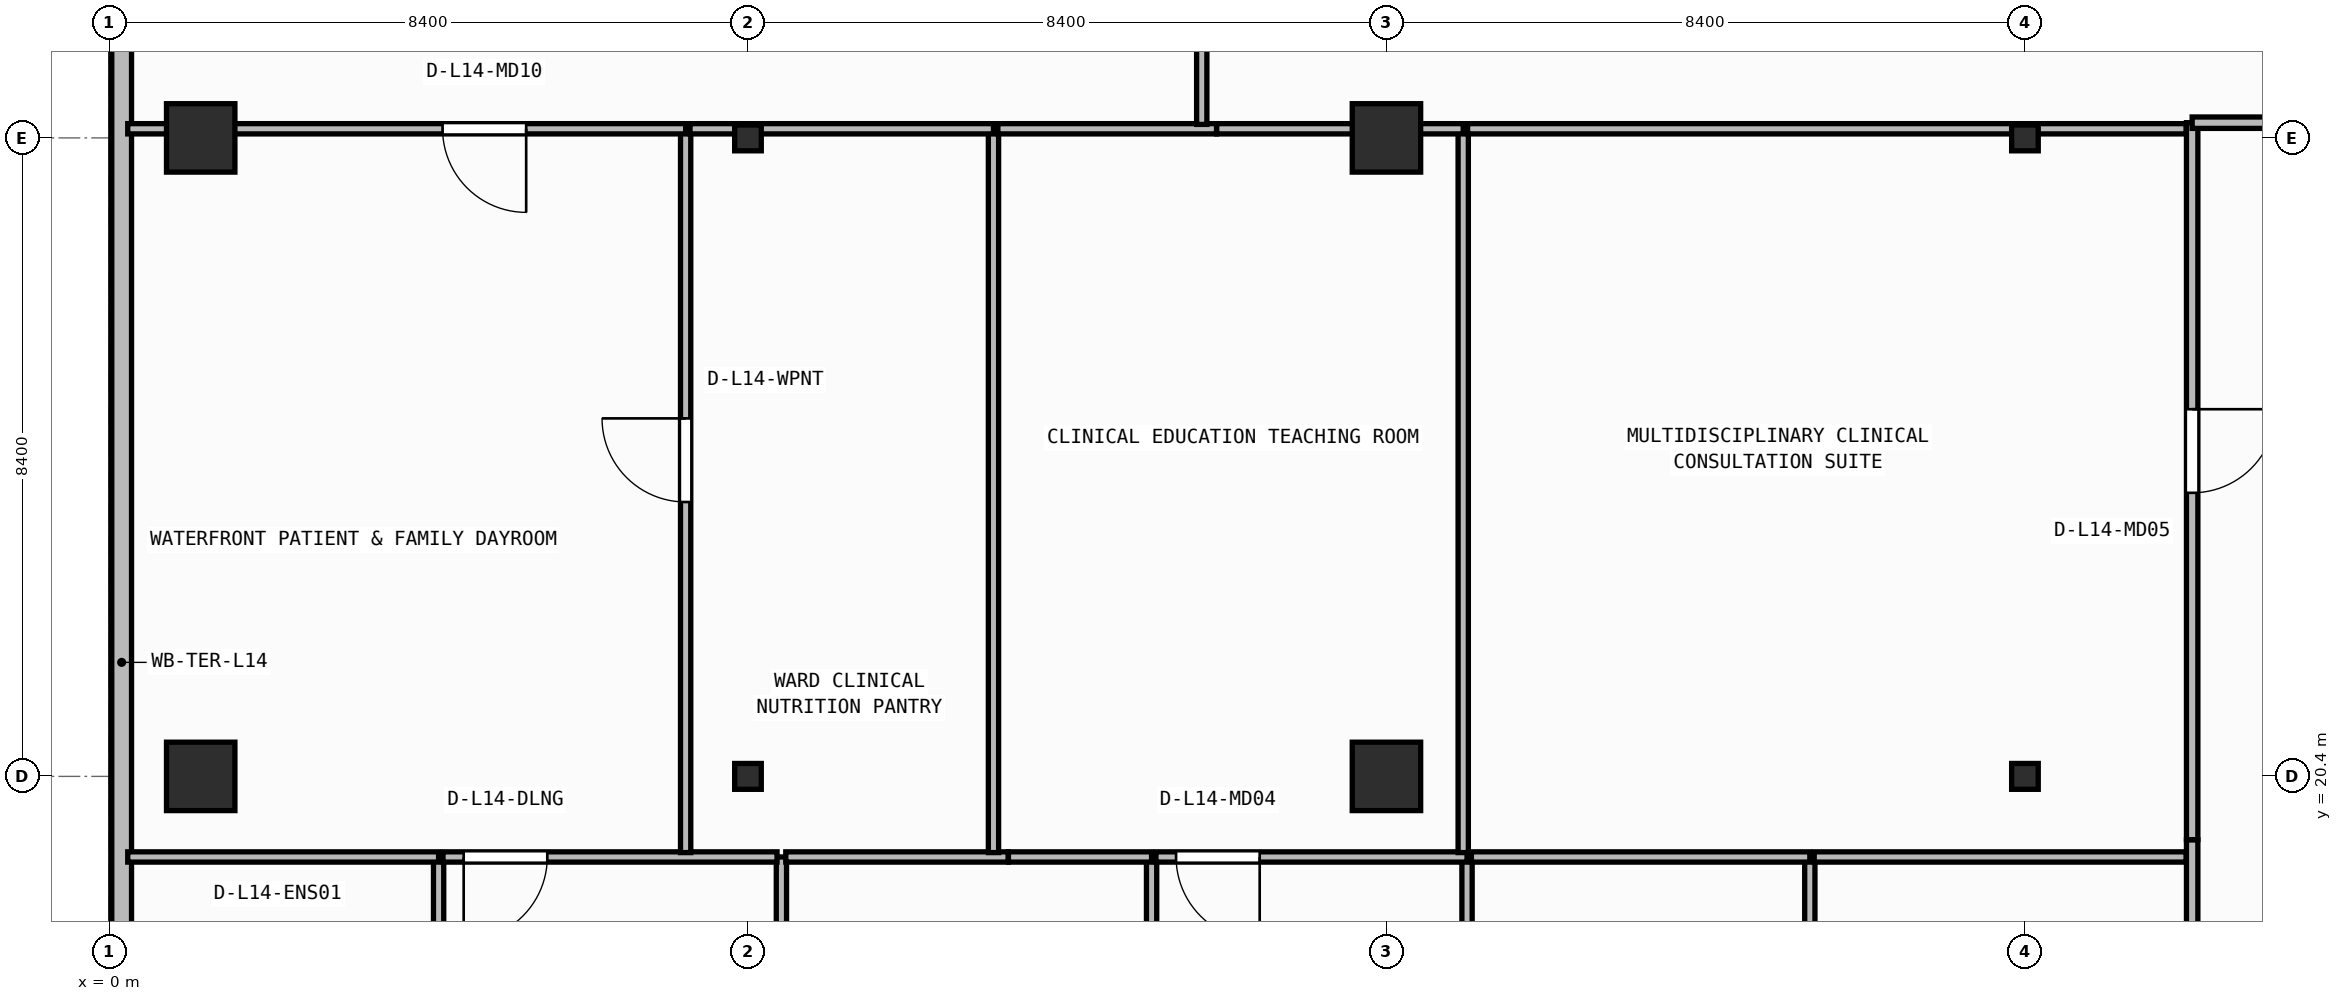
"""IFC4 building model, lengths in metres.
Left out: names, types, materials, properties, quantities, classifications, styles, units other than length and angle.
Written with IfcOpenShell. Run it as: python <this file> out.ifc"""

import sys

from ifc_helpers import new_model, si_unit, direction, frame, frame_2d, origin, origin_2d, place, context, subcontext, project, spatial, rectangle, i_section, extrude, element, fill, save


model = new_model("IFC4")
c1 = context("Model", 3, precision=1e-05, world=origin(), true_north=direction((0.0, 1.0)))
c2 = subcontext(c1, "Body", "Model", "MODEL_VIEW")
j1 = project(units=[si_unit("LENGTHUNIT", "METRE"), si_unit("PLANEANGLEUNIT", "RADIAN")], contexts=[c1])
p1 = place(None, origin())
s1 = spatial("IfcSite", under=j1, at=p1, CompositionType="ELEMENT")
p2 = place(p1, origin())
s2 = spatial("IfcBuilding", under=s1, at=p2, CompositionType="ELEMENT")
p3 = place(p2, frame((0.0, 0.0, 58.05)))
s3 = spatial("IfcBuildingStorey", under=s2, at=p3, CompositionType="ELEMENT", Elevation=58.05)
p4 = place(p3, frame((1.2, 20.4, 0.0), z_axis=(0.0, 0.0, 1.0), x_axis=(1.0, 0.0, 0.0)))
e1 = element("IfcColumn", 1, at=p4, inside=s3, PredefinedType="COLUMN", context=c2, shape_type="SweptSolid", body=[
    extrude(rectangle(XDim=0.9, YDim=0.9, at=origin_2d()), origin(), (0.0, 0.0, 1.0), 3.95),
])
p5 = place(p3, frame((8.4, 20.4, 0.0), z_axis=(0.0, 0.0, 1.0), x_axis=(1.0, 0.0, 0.0)))
e2 = element("IfcColumn", 2, at=p5, inside=s3, PredefinedType="COLUMN", context=c2, shape_type="SweptSolid", body=[
    extrude(i_section(OverallWidth=0.35, OverallDepth=0.34, WebThickness=0.016, FlangeThickness=0.028, at=origin_2d()), origin(), (0.0, 0.0, 1.0), 3.95),
])
p6 = place(p3, frame((16.8, 20.4, 0.0), z_axis=(0.0, 0.0, 1.0), x_axis=(1.0, 0.0, 0.0)))
e3 = element("IfcColumn", 3, at=p6, inside=s3, PredefinedType="COLUMN", context=c2, shape_type="SweptSolid", body=[
    extrude(rectangle(XDim=0.9, YDim=0.9, at=origin_2d()), origin(), (0.0, 0.0, 1.0), 3.95),
])
p7 = place(p3, frame((25.2, 20.4, 0.0), z_axis=(0.0, 0.0, 1.0), x_axis=(1.0, 0.0, 0.0)))
e4 = element("IfcColumn", 4, at=p7, inside=s3, PredefinedType="COLUMN", context=c2, shape_type="SweptSolid", body=[
    extrude(i_section(OverallWidth=0.35, OverallDepth=0.34, WebThickness=0.016, FlangeThickness=0.028, at=origin_2d()), origin(), (0.0, 0.0, 1.0), 3.95),
])
p8 = place(p3, frame((1.2, 28.8, 0.0), z_axis=(0.0, 0.0, 1.0), x_axis=(1.0, 0.0, 0.0)))
e5 = element("IfcColumn", 5, at=p8, inside=s3, PredefinedType="COLUMN", context=c2, shape_type="SweptSolid", body=[
    extrude(rectangle(XDim=0.9, YDim=0.9, at=origin_2d()), origin(), (0.0, 0.0, 1.0), 3.95),
])
p9 = place(p3, frame((8.4, 28.8, 0.0), z_axis=(0.0, 0.0, 1.0), x_axis=(1.0, 0.0, 0.0)))
e6 = element("IfcColumn", 6, at=p9, inside=s3, PredefinedType="COLUMN", context=c2, shape_type="SweptSolid", body=[
    extrude(i_section(OverallWidth=0.35, OverallDepth=0.34, WebThickness=0.016, FlangeThickness=0.028, at=origin_2d()), origin(), (0.0, 0.0, 1.0), 3.95),
])
p10 = place(p3, frame((16.8, 28.8, 0.0), z_axis=(0.0, 0.0, 1.0), x_axis=(1.0, 0.0, 0.0)))
e7 = element("IfcColumn", 7, at=p10, inside=s3, PredefinedType="COLUMN", context=c2, shape_type="SweptSolid", body=[
    extrude(rectangle(XDim=0.9, YDim=0.9, at=origin_2d()), origin(), (0.0, 0.0, 1.0), 3.95),
])
p11 = place(p3, frame((25.2, 28.8, 0.0), z_axis=(0.0, 0.0, 1.0), x_axis=(1.0, 0.0, 0.0)))
e8 = element("IfcColumn", 8, at=p11, inside=s3, PredefinedType="COLUMN", context=c2, shape_type="SweptSolid", body=[
    extrude(i_section(OverallWidth=0.35, OverallDepth=0.34, WebThickness=0.016, FlangeThickness=0.028, at=origin_2d()), origin(), (0.0, 0.0, 1.0), 3.95),
])
p12 = place(p3, frame((0.16, 41.04, 0.0), z_axis=(0.0, 0.0, 1.0), x_axis=(0.0, -1.0, 0.0)))
e9 = element("IfcWall", 9, at=p12, inside=s3, PredefinedType="STANDARD", context=c2, shape_type="SweptSolid", body=[
    extrude(rectangle(XDim=38.28, YDim=0.26, at=frame_2d((19.14, 0.0))), origin(), (0.0, 0.0, 1.0), 3.71),
])
p13 = place(p12, frame((30.187, 0.0, 0.0)))
e10 = element("IfcOpeningElement", 10, at=p13, cuts=e9, PredefinedType="OPENING", context=c2, shape_type="SweptSolid", body=[
    extrude(rectangle(XDim=1.3, YDim=2.15, at=frame_2d((0.65, 1.075))), frame((0.0, 0.14, 0.0), z_axis=(0.0, -1.0, 0.0), x_axis=(1.0, 0.0, 0.0)), (0.0, 0.0, 1.0), 0.28),
])
p14 = place(p12, frame((22.869, 0.0, 0.9)))
e11 = element("IfcOpeningElement", 11, at=p14, cuts=e9, PredefinedType="OPENING", context=c2, shape_type="SweptSolid", body=[
    extrude(rectangle(XDim=2.4, YDim=1.65, at=frame_2d((1.2, 0.825))), frame((0.0, 0.14, 0.0), z_axis=(0.0, -1.0, 0.0), x_axis=(1.0, 0.0, 0.0)), (0.0, 0.0, 1.0), 0.28),
])
p15 = place(p3, frame((27.4, 19.566, 0.0), z_axis=(0.0, 0.0, 1.0), x_axis=(0.0, -1.0, 0.0)))
e12 = element("IfcWall", 12, at=p15, inside=s3, PredefinedType="PARTITIONING", context=c2, shape_type="SweptSolid", body=[
    extrude(rectangle(XDim=4.866, YDim=0.15, at=frame_2d((2.433, 0.0))), origin(), (0.0, 0.0, 1.0), 3.71),
])
p16 = place(p3, frame((27.4, 29.0, 0.0), z_axis=(0.0, 0.0, 1.0), x_axis=(0.0, -1.0, 0.0)))
e13 = element("IfcWall", 13, at=p16, inside=s3, PredefinedType="PARTITIONING", context=c2, shape_type="SweptSolid", body=[
    extrude(rectangle(XDim=9.432, YDim=0.15, at=frame_2d((4.716, 0.0))), origin(), (0.0, 0.0, 1.0), 3.71),
])
p17 = place(p16, frame((3.769, 0.0, 0.0)))
e14 = element("IfcOpeningElement", 14, at=p17, cuts=e13, PredefinedType="OPENING", context=c2, shape_type="SweptSolid", body=[
    extrude(rectangle(XDim=1.1, YDim=2.1, at=frame_2d((0.55, 1.05))), frame((0.0, 0.085, 0.0), z_axis=(0.0, -1.0, 0.0), x_axis=(1.0, 0.0, 0.0)), (0.0, 0.0, 1.0), 0.17),
])
p18 = place(p3, frame((29.9, 29.0, 0.0), z_axis=(0.0, 0.0, 1.0), x_axis=(-1.0, 0.0, 0.0)))
e15 = element("IfcWall", 15, at=p18, inside=s3, PredefinedType="PARTITIONING", context=c2, shape_type="SweptSolid", body=[
    extrude(rectangle(XDim=2.5, YDim=0.15, at=frame_2d((1.25, 0.0))), origin(), (0.0, 0.0, 1.0), 3.279),
])
p19 = place(p18, frame((0.225, 0.0, 0.0)))
e16 = element("IfcOpeningElement", 16, at=p19, cuts=e15, PredefinedType="OPENING", context=c2, shape_type="SweptSolid", body=[
    extrude(rectangle(XDim=1.1, YDim=2.1, at=frame_2d((0.55, 1.05))), frame((0.0, 0.085, 0.0), z_axis=(0.0, -1.0, 0.0), x_axis=(1.0, 0.0, 0.0)), (0.0, 0.0, 1.0), 0.17),
])
p20 = place(p3, frame((4.33, 18.04, 0.0), z_axis=(0.0, 0.0, 1.0), x_axis=(0.0, 1.0, 0.0)))
e17 = element("IfcWall", 17, at=p20, inside=s3, PredefinedType="PARTITIONING", context=c2, shape_type="SweptSolid", body=[
    extrude(rectangle(XDim=1.3, YDim=0.135, at=frame_2d((0.65, 0.0))), origin(), (0.0, 0.0, 1.0), 3.71),
])
p21 = place(p3, frame((4.33, 19.34, 0.0), z_axis=(0.0, 0.0, 1.0), x_axis=(-1.0, 0.0, 0.0)))
e18 = element("IfcWall", 18, at=p21, inside=s3, PredefinedType="PARTITIONING", context=c2, shape_type="SweptSolid", body=[
    extrude(rectangle(XDim=4.09, YDim=0.135, at=frame_2d((2.045, 0.0))), origin(), (0.0, 0.0, 1.0), 3.71),
])
p22 = place(p3, frame((8.84, 17.833, 0.0), z_axis=(0.0, 0.0, 1.0), x_axis=(0.0, 1.0, 0.0)))
e19 = element("IfcWall", 19, at=p22, inside=s3, PredefinedType="PARTITIONING", context=c2, shape_type="SweptSolid", body=[
    extrude(rectangle(XDim=1.508, YDim=0.135, at=frame_2d((0.754, 0.0))), origin(), (0.0, 0.0, 1.0), 3.71),
])
p23 = place(p3, frame((8.782, 19.34, 0.0), z_axis=(0.0, 0.0, 1.0), x_axis=(-1.0, 0.0, 0.0)))
e20 = element("IfcWall", 20, at=p23, inside=s3, PredefinedType="PARTITIONING", context=c2, shape_type="SweptSolid", body=[
    extrude(rectangle(XDim=4.395, YDim=0.135, at=frame_2d((2.198, 0.0))), origin(), (0.0, 0.0, 1.0), 3.71),
])
p24 = place(p23, frame((3.023, 0.0, 0.0)))
e21 = element("IfcOpeningElement", 21, at=p24, cuts=e20, PredefinedType="OPENING", context=c2, shape_type="SweptSolid", body=[
    extrude(rectangle(XDim=1.1, YDim=2.1, at=frame_2d((0.55, 1.05))), frame((0.0, 0.077, 0.0), z_axis=(0.0, -1.0, 0.0), x_axis=(1.0, 0.0, 0.0)), (0.0, 0.0, 1.0), 0.155),
])
p25 = place(p3, frame((13.71, 14.76, 0.0), z_axis=(0.0, 0.0, 1.0), x_axis=(0.0, 1.0, 0.0)))
e22 = element("IfcWall", 22, at=p25, inside=s3, PredefinedType="PARTITIONING", context=c2, shape_type="SweptSolid", body=[
    extrude(rectangle(XDim=4.58, YDim=0.135, at=frame_2d((2.29, 0.0))), origin(), (0.0, 0.0, 1.0), 3.71),
])
p26 = place(p3, frame((11.825, 19.34, 0.0), z_axis=(0.0, 0.0, 1.0), x_axis=(-1.0, 0.0, 0.0)))
e23 = element("IfcWall", 23, at=p26, inside=s3, PredefinedType="PARTITIONING", context=c2, shape_type="SweptSolid", body=[
    extrude(rectangle(XDim=2.927, YDim=0.135, at=frame_2d((1.464, 0.0))), origin(), (0.0, 0.0, 1.0), 3.71),
])
p27 = place(p3, frame((13.71, 19.34, 0.0), z_axis=(0.0, 0.0, 1.0), x_axis=(-1.0, 0.0, 0.0)))
e24 = element("IfcWall", 24, at=p27, inside=s3, PredefinedType="PARTITIONING", context=c2, shape_type="SweptSolid", body=[
    extrude(rectangle(XDim=1.883, YDim=0.135, at=frame_2d((0.942, 0.0))), origin(), (0.0, 0.0, 1.0), 3.71),
])
p28 = place(p3, frame((17.86, 17.833, 0.0), z_axis=(0.0, 0.0, 1.0), x_axis=(0.0, 1.0, 0.0)))
e25 = element("IfcWall", 25, at=p28, inside=s3, PredefinedType="PARTITIONING", context=c2, shape_type="SweptSolid", body=[
    extrude(rectangle(XDim=1.508, YDim=0.135, at=frame_2d((0.754, 0.0))), origin(), (0.0, 0.0, 1.0), 3.71),
])
p29 = place(p3, frame((17.86, 19.34, 0.0), z_axis=(0.0, 0.0, 1.0), x_axis=(-1.0, 0.0, 0.0)))
e26 = element("IfcWall", 26, at=p29, inside=s3, PredefinedType="PARTITIONING", context=c2, shape_type="SweptSolid", body=[
    extrude(rectangle(XDim=4.093, YDim=0.135, at=frame_2d((2.046, 0.0))), origin(), (0.0, 0.0, 1.0), 3.71),
])
p30 = place(p29, frame((2.728, 0.0, 0.0)))
e27 = element("IfcOpeningElement", 27, at=p30, cuts=e26, PredefinedType="OPENING", context=c2, shape_type="SweptSolid", body=[
    extrude(rectangle(XDim=1.1, YDim=2.1, at=frame_2d((0.55, 1.05))), frame((0.0, 0.077, 0.0), z_axis=(0.0, -1.0, 0.0), x_axis=(1.0, 0.0, 0.0)), (0.0, 0.0, 1.0), 0.155),
])
p31 = place(p3, frame((22.37, 14.76, 0.0), z_axis=(0.0, 0.0, 1.0), x_axis=(0.0, 1.0, 0.0)))
e28 = element("IfcWall", 28, at=p31, inside=s3, PredefinedType="PARTITIONING", context=c2, shape_type="SweptSolid", body=[
    extrude(rectangle(XDim=4.58, YDim=0.135, at=frame_2d((2.29, 0.0))), origin(), (0.0, 0.0, 1.0), 3.71),
])
p32 = place(p3, frame((22.37, 19.34, 0.0), z_axis=(0.0, 0.0, 1.0), x_axis=(-1.0, 0.0, 0.0)))
e29 = element("IfcWall", 29, at=p32, inside=s3, PredefinedType="PARTITIONING", context=c2, shape_type="SweptSolid", body=[
    extrude(rectangle(XDim=4.453, YDim=0.135, at=frame_2d((2.226, 0.0))), origin(), (0.0, 0.0, 1.0), 3.71),
])
p33 = place(p3, frame((27.32, 19.34, 0.0), z_axis=(0.0, 0.0, 1.0), x_axis=(-1.0, 0.0, 0.0)))
e30 = element("IfcWall", 30, at=p33, inside=s3, PredefinedType="PARTITIONING", context=c2, shape_type="SweptSolid", body=[
    extrude(rectangle(XDim=4.893, YDim=0.135, at=frame_2d((2.446, 0.0))), origin(), (0.0, 0.0, 1.0), 3.71),
])
p34 = place(p3, frame((7.58, 19.397, 0.0), z_axis=(0.0, 0.0, 1.0), x_axis=(0.0, 1.0, 0.0)))
e31 = element("IfcWall", 31, at=p34, inside=s3, PredefinedType="PARTITIONING", context=c2, shape_type="SweptSolid", body=[
    extrude(rectangle(XDim=9.522, YDim=0.135, at=frame_2d((4.761, 0.0))), origin(), (0.0, 0.0, 1.0), 3.71),
])
p35 = place(p34, frame((4.612, 0.0, 0.0)))
e32 = element("IfcOpeningElement", 32, at=p35, cuts=e31, PredefinedType="OPENING", context=c2, shape_type="SweptSolid", body=[
    extrude(rectangle(XDim=1.1, YDim=2.1, at=frame_2d((0.55, 1.05))), frame((0.0, 0.077, 0.0), z_axis=(0.0, -1.0, 0.0), x_axis=(1.0, 0.0, 0.0)), (0.0, 0.0, 1.0), 0.155),
])
p36 = place(p3, frame((7.58, 28.92, 0.0), z_axis=(0.0, 0.0, 1.0), x_axis=(-1.0, 0.0, 0.0)))
e33 = element("IfcWall", 33, at=p36, inside=s3, PredefinedType="PARTITIONING", context=c2, shape_type="SweptSolid", body=[
    extrude(rectangle(XDim=7.34, YDim=0.135, at=frame_2d((3.67, 0.0))), origin(), (0.0, 0.0, 1.0), 3.073),
])
p37 = place(p36, frame((2.098, 0.0, 0.0)))
e34 = element("IfcOpeningElement", 34, at=p37, cuts=e33, PredefinedType="OPENING", context=c2, shape_type="SweptSolid", body=[
    extrude(rectangle(XDim=1.1, YDim=2.1, at=frame_2d((0.55, 1.05))), frame((0.0, 0.077, 0.0), z_axis=(0.0, -1.0, 0.0), x_axis=(1.0, 0.0, 0.0)), (0.0, 0.0, 1.0), 0.155),
])
p38 = place(p3, frame((11.63, 19.397, 0.0), z_axis=(0.0, 0.0, 1.0), x_axis=(0.0, 1.0, 0.0)))
e35 = element("IfcWall", 35, at=p38, inside=s3, PredefinedType="PARTITIONING", context=c2, shape_type="SweptSolid", body=[
    extrude(rectangle(XDim=9.522, YDim=0.135, at=frame_2d((4.761, 0.0))), origin(), (0.0, 0.0, 1.0), 3.71),
])
p39 = place(p3, frame((11.63, 28.92, 0.0), z_axis=(0.0, 0.0, 1.0), x_axis=(-1.0, 0.0, 0.0)))
e36 = element("IfcWall", 36, at=p39, inside=s3, PredefinedType="PARTITIONING", context=c2, shape_type="SweptSolid", body=[
    extrude(rectangle(XDim=3.992, YDim=0.135, at=frame_2d((1.996, 0.0))), origin(), (0.0, 0.0, 1.0), 3.073),
])
p40 = place(p3, frame((17.81, 19.397, 0.0), z_axis=(0.0, 0.0, 1.0), x_axis=(0.0, 1.0, 0.0)))
e37 = element("IfcWall", 37, at=p40, inside=s3, PredefinedType="PARTITIONING", context=c2, shape_type="SweptSolid", body=[
    extrude(rectangle(XDim=9.522, YDim=0.135, at=frame_2d((4.761, 0.0))), origin(), (0.0, 0.0, 1.0), 3.71),
])
p41 = place(p3, frame((14.565, 28.92, 0.0), z_axis=(0.0, 0.0, 1.0), x_axis=(-1.0, 0.0, 0.0)))
e38 = element("IfcWall", 38, at=p41, inside=s3, PredefinedType="PARTITIONING", context=c2, shape_type="SweptSolid", body=[
    extrude(rectangle(XDim=2.877, YDim=0.135, at=frame_2d((1.438, 0.0))), origin(), (0.0, 0.0, 1.0), 3.073),
])
p42 = place(p3, frame((17.81, 28.92, 0.0), z_axis=(0.0, 0.0, 1.0), x_axis=(-1.0, 0.0, 0.0)))
e39 = element("IfcWall", 39, at=p42, inside=s3, PredefinedType="PARTITIONING", context=c2, shape_type="SweptSolid", body=[
    extrude(rectangle(XDim=3.243, YDim=0.135, at=frame_2d((1.622, 0.0))), origin(), (0.0, 0.0, 1.0), 3.073),
])
p43 = place(p3, frame((27.32, 28.92, 0.0), z_axis=(0.0, 0.0, 1.0), x_axis=(-1.0, 0.0, 0.0)))
e40 = element("IfcWall", 40, at=p43, inside=s3, PredefinedType="PARTITIONING", context=c2, shape_type="SweptSolid", body=[
    extrude(rectangle(XDim=9.453, YDim=0.135, at=frame_2d((4.726, 0.0))), origin(), (0.0, 0.0, 1.0), 3.073),
])
p44 = place(p3, frame((14.37, 28.978, 0.0), z_axis=(0.0, 0.0, 1.0), x_axis=(0.0, 1.0, 0.0)))
e41 = element("IfcWall", 41, at=p44, inside=s3, PredefinedType="PARTITIONING", context=c2, shape_type="SweptSolid", body=[
    extrude(rectangle(XDim=7.222, YDim=0.135, at=frame_2d((3.611, 0.0))), origin(), (0.0, 0.0, 1.0), 3.71),
])
p45 = place(p17, origin())
e42 = element("IfcDoor", 42, at=p45, inside=s3, OperationType="SINGLE_SWING_LEFT", PredefinedType="DOOR", context=c2, shape_type="SweptSolid", body=[
    extrude(rectangle(XDim=1.1, YDim=2.1, at=frame_2d((0.55, 1.05))), frame((0.0, 0.025, 0.0), z_axis=(0.0, -1.0, 0.0), x_axis=(1.0, 0.0, 0.0)), (0.0, 0.0, 1.0), 0.05),
])
fill(e14, e42)
p46 = place(p24, origin())
e43 = element("IfcDoor", 43, at=p46, inside=s3, OperationType="SINGLE_SWING_RIGHT", PredefinedType="DOOR", context=c2, shape_type="SweptSolid", body=[
    extrude(rectangle(XDim=1.1, YDim=2.1, at=frame_2d((0.55, 1.05))), frame((0.0, 0.025, 0.0), z_axis=(0.0, -1.0, 0.0), x_axis=(1.0, 0.0, 0.0)), (0.0, 0.0, 1.0), 0.05),
])
fill(e21, e43)
p47 = place(p30, origin())
e44 = element("IfcDoor", 44, at=p47, inside=s3, OperationType="SINGLE_SWING_LEFT", PredefinedType="DOOR", context=c2, shape_type="SweptSolid", body=[
    extrude(rectangle(XDim=1.1, YDim=2.1, at=frame_2d((0.55, 1.05))), frame((0.0, 0.025, 0.0), z_axis=(0.0, -1.0, 0.0), x_axis=(1.0, 0.0, 0.0)), (0.0, 0.0, 1.0), 0.05),
])
fill(e27, e44)
p48 = place(p35, origin())
e45 = element("IfcDoor", 45, at=p48, inside=s3, OperationType="SINGLE_SWING_RIGHT", PredefinedType="DOOR", context=c2, shape_type="SweptSolid", body=[
    extrude(rectangle(XDim=1.1, YDim=2.1, at=frame_2d((0.55, 1.05))), frame((0.0, 0.025, 0.0), z_axis=(0.0, -1.0, 0.0), x_axis=(1.0, 0.0, 0.0)), (0.0, 0.0, 1.0), 0.05),
])
fill(e32, e45)
p49 = place(p37, origin())
e46 = element("IfcDoor", 46, at=p49, inside=s3, OperationType="SINGLE_SWING_LEFT", PredefinedType="DOOR", context=c2, shape_type="SweptSolid", body=[
    extrude(rectangle(XDim=1.1, YDim=2.1, at=frame_2d((0.55, 1.05))), frame((0.0, 0.025, 0.0), z_axis=(0.0, -1.0, 0.0), x_axis=(1.0, 0.0, 0.0)), (0.0, 0.0, 1.0), 0.05),
])
fill(e34, e46)
save(model, sys.argv[1])
